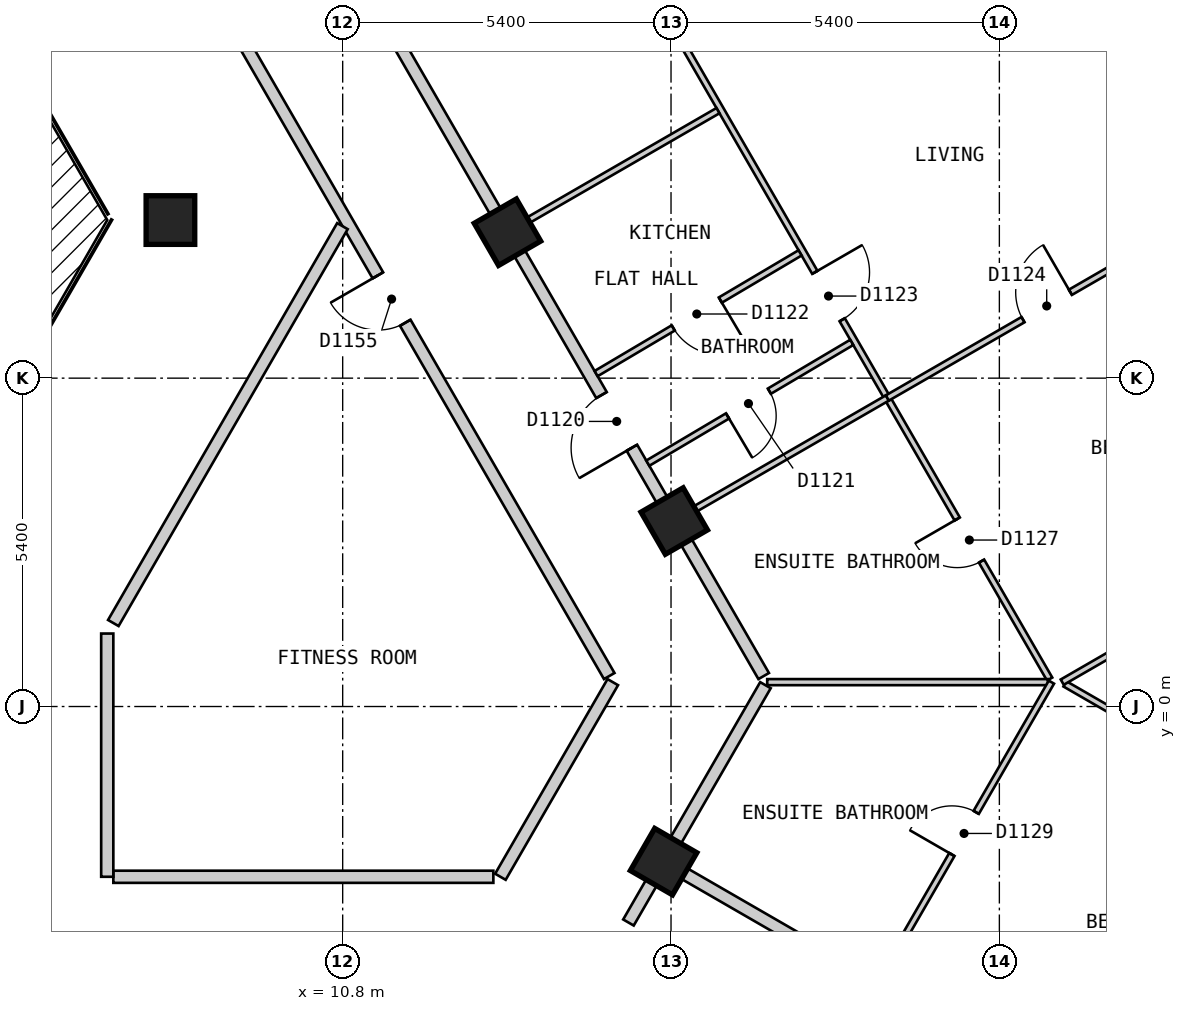
"""IFC4 building model, lengths in metres.
Left out: names, types, materials, properties, quantities, classifications, styles, units other than length and angle.
Written with IfcOpenShell. Run it as: python <this file> out.ifc"""

import sys

from ifc_helpers import new_model, si_unit, direction, frame, frame_2d, origin, origin_2d, place, context, subcontext, project, spatial, polyline, rectangle, outline, extrude, element, fill, save


model = new_model("IFC4")
c1 = context("Model", 3, precision=1e-05, world=origin(), true_north=direction((0.0, 1.0)))
c2 = subcontext(c1, "Body", "Model", "MODEL_VIEW")
j1 = project(units=[si_unit("LENGTHUNIT", "METRE"), si_unit("PLANEANGLEUNIT", "RADIAN")], contexts=[c1])
p1 = place(None, origin())
s1 = spatial("IfcSite", under=j1, at=p1, CompositionType="ELEMENT")
p2 = place(p1, origin())
s2 = spatial("IfcBuilding", under=s1, at=p2, CompositionType="ELEMENT")
p3 = place(p2, frame((0.0, 0.0, 144.6)))
s3 = spatial("IfcBuildingStorey", under=s2, at=p3, CompositionType="ELEMENT", Elevation=144.6)
for number, where, z_axis, x_axis in (
    (1, (16.078, -2.551, 0.0), (0.0, 0.0, 1.0), (0.5, 0.866, 0.0)),
    (2, (16.253, 3.05, 0.0), (0.0, 0.0, 1.0), (-0.5, 0.866, 0.0)),
    (3, (13.51, 7.8, 0.0), (0.0, 0.0, 1.0), (-0.5, 0.866, 0.0)),
    (4, (7.967, 8.0, 0.0), (0.0, 0.0, 1.0), (1.0, 0.0, 0.0)),
):
    element("IfcColumn", number, at=place(p3, frame(where, z_axis=z_axis, x_axis=x_axis)), inside=s3, PredefinedType="COLUMN", context=c2, shape_type="SweptSolid", body=[
        extrude(rectangle(XDim=0.8, YDim=0.8, at=origin_2d()), origin(), (0.0, 0.0, 1.0), 3.0),
    ])
p4 = place(p3, frame((15.862, -23.425, 0.0), z_axis=(0.0, 0.0, 1.0), x_axis=(0.500017503135, 0.866015298109, 0.0)))
e5 = element("IfcWall", 5, at=p4, inside=s3, PredefinedType="SOLIDWALL", context=c2, shape_type="SweptSolid", body=[
    extrude(outline(polyline([(0.0, -0.15), (24.711, -0.15), (24.631, 0.15), (0.08, 0.15), (0.0, -0.15)])), origin(), (0.0, 0.0, 1.0), 2.7),
])
p5 = place(p4, frame((1.4, 0.0, 0.15)))
e6 = element("IfcOpeningElement", 6, at=p5, cuts=e5, PredefinedType="OPENING", context=c2, shape_type="SweptSolid", body=[
    extrude(rectangle(XDim=1.5, YDim=2.1, at=frame_2d((0.75, 1.05))), frame((0.0, 0.16, 0.0), z_axis=(0.0, -1.0, 0.0), x_axis=(1.0, 0.0, 0.0)), (0.0, 0.0, 1.0), 0.32),
])
p6 = place(p4, frame((4.316, 0.0, 0.15)))
e7 = element("IfcOpeningElement", 7, at=p6, cuts=e5, PredefinedType="OPENING", context=c2, shape_type="SweptSolid", body=[
    extrude(rectangle(XDim=1.5, YDim=2.1, at=frame_2d((0.75, 1.05))), frame((0.0, 0.16, 0.0), z_axis=(0.0, -1.0, 0.0), x_axis=(1.0, 0.0, 0.0)), (0.0, 0.0, 1.0), 0.32),
])
p7 = place(p4, frame((7.231, 0.0, 0.15)))
e8 = element("IfcOpeningElement", 8, at=p7, cuts=e5, PredefinedType="OPENING", context=c2, shape_type="SweptSolid", body=[
    extrude(rectangle(XDim=1.5, YDim=2.1, at=frame_2d((0.75, 1.05))), frame((0.0, 0.16, 0.0), z_axis=(0.0, -1.0, 0.0), x_axis=(1.0, 0.0, 0.0)), (0.0, 0.0, 1.0), 0.32),
])
p8 = place(p4, frame((10.147, 0.0, 0.15)))
e9 = element("IfcOpeningElement", 9, at=p8, cuts=e5, PredefinedType="OPENING", context=c2, shape_type="SweptSolid", body=[
    extrude(rectangle(XDim=1.5, YDim=2.1, at=frame_2d((0.75, 1.05))), frame((0.0, 0.16, 0.0), z_axis=(0.0, -1.0, 0.0), x_axis=(1.0, 0.0, 0.0)), (0.0, 0.0, 1.0), 0.32),
])
p9 = place(p4, frame((13.062, 0.0, 0.15)))
e10 = element("IfcOpeningElement", 10, at=p9, cuts=e5, PredefinedType="OPENING", context=c2, shape_type="SweptSolid", body=[
    extrude(rectangle(XDim=1.5, YDim=2.1, at=frame_2d((0.75, 1.05))), frame((0.0, 0.16, 0.0), z_axis=(0.0, -1.0, 0.0), x_axis=(1.0, 0.0, 0.0)), (0.0, 0.0, 1.0), 0.32),
])
p10 = place(p4, frame((15.977, 0.0, 0.15)))
e11 = element("IfcOpeningElement", 11, at=p10, cuts=e5, PredefinedType="OPENING", context=c2, shape_type="SweptSolid", body=[
    extrude(rectangle(XDim=1.5, YDim=2.1, at=frame_2d((0.75, 1.05))), frame((0.0, 0.16, 0.0), z_axis=(0.0, -1.0, 0.0), x_axis=(1.0, 0.0, 0.0)), (0.0, 0.0, 1.0), 0.32),
])
p11 = place(p4, frame((18.893, 0.0, 0.15)))
e12 = element("IfcOpeningElement", 12, at=p11, cuts=e5, PredefinedType="OPENING", context=c2, shape_type="SweptSolid", body=[
    extrude(rectangle(XDim=1.5, YDim=2.1, at=frame_2d((0.75, 1.05))), frame((0.0, 0.16, 0.0), z_axis=(0.0, -1.0, 0.0), x_axis=(1.0, 0.0, 0.0)), (0.0, 0.0, 1.0), 0.32),
])
p12 = place(p4, frame((21.809, 0.0, 0.15)))
e13 = element("IfcOpeningElement", 13, at=p12, cuts=e5, PredefinedType="OPENING", context=c2, shape_type="SweptSolid", body=[
    extrude(rectangle(XDim=1.5, YDim=2.1, at=frame_2d((0.75, 1.05))), frame((0.0, 0.16, 0.0), z_axis=(0.0, -1.0, 0.0), x_axis=(1.0, 0.0, 0.0)), (0.0, 0.0, 1.0), 0.32),
])
p13 = place(p3, frame((28.218, 2.825, 0.0), z_axis=(0.0, 0.0, 1.0), x_axis=(-0.500020536353, 0.866013546791, 0.0)))
e14 = element("IfcWall", 14, at=p13, inside=s3, PredefinedType="SOLIDWALL", context=c2, shape_type="SweptSolid", body=[
    extrude(outline(polyline([(0.0, -0.15), (23.325, -0.15), (23.245, 0.15), (0.08, 0.15), (0.0, -0.15)])), origin(), (0.0, 0.0, 1.0), 2.7),
])
p14 = place(p13, frame((1.314, 0.0, 0.15)))
e15 = element("IfcOpeningElement", 15, at=p14, cuts=e14, PredefinedType="OPENING", context=c2, shape_type="SweptSolid", body=[
    extrude(rectangle(XDim=1.5, YDim=2.1, at=frame_2d((0.75, 1.05))), frame((0.0, 0.16, 0.0), z_axis=(0.0, -1.0, 0.0), x_axis=(1.0, 0.0, 0.0)), (0.0, 0.0, 1.0), 0.32),
])
p15 = place(p13, frame((4.056, 0.0, 0.15)))
e16 = element("IfcOpeningElement", 16, at=p15, cuts=e14, PredefinedType="OPENING", context=c2, shape_type="SweptSolid", body=[
    extrude(rectangle(XDim=1.5, YDim=2.1, at=frame_2d((0.75, 1.05))), frame((0.0, 0.16, 0.0), z_axis=(0.0, -1.0, 0.0), x_axis=(1.0, 0.0, 0.0)), (0.0, 0.0, 1.0), 0.32),
])
p16 = place(p13, frame((6.798, 0.0, 0.15)))
e17 = element("IfcOpeningElement", 17, at=p16, cuts=e14, PredefinedType="OPENING", context=c2, shape_type="SweptSolid", body=[
    extrude(rectangle(XDim=1.5, YDim=2.1, at=frame_2d((0.75, 1.05))), frame((0.0, 0.16, 0.0), z_axis=(0.0, -1.0, 0.0), x_axis=(1.0, 0.0, 0.0)), (0.0, 0.0, 1.0), 0.32),
])
p17 = place(p13, frame((9.541, 0.0, 0.15)))
e18 = element("IfcOpeningElement", 18, at=p17, cuts=e14, PredefinedType="OPENING", context=c2, shape_type="SweptSolid", body=[
    extrude(rectangle(XDim=1.5, YDim=2.1, at=frame_2d((0.75, 1.05))), frame((0.0, 0.16, 0.0), z_axis=(0.0, -1.0, 0.0), x_axis=(1.0, 0.0, 0.0)), (0.0, 0.0, 1.0), 0.32),
])
p18 = place(p13, frame((12.284, 0.0, 0.15)))
e19 = element("IfcOpeningElement", 19, at=p18, cuts=e14, PredefinedType="OPENING", context=c2, shape_type="SweptSolid", body=[
    extrude(rectangle(XDim=1.5, YDim=2.1, at=frame_2d((0.75, 1.05))), frame((0.0, 0.16, 0.0), z_axis=(0.0, -1.0, 0.0), x_axis=(1.0, 0.0, 0.0)), (0.0, 0.0, 1.0), 0.32),
])
p19 = place(p13, frame((15.027, 0.0, 0.15)))
e20 = element("IfcOpeningElement", 20, at=p19, cuts=e14, PredefinedType="OPENING", context=c2, shape_type="SweptSolid", body=[
    extrude(rectangle(XDim=1.5, YDim=2.1, at=frame_2d((0.75, 1.05))), frame((0.0, 0.16, 0.0), z_axis=(0.0, -1.0, 0.0), x_axis=(1.0, 0.0, 0.0)), (0.0, 0.0, 1.0), 0.32),
])
p20 = place(p13, frame((17.769, 0.0, 0.15)))
e21 = element("IfcOpeningElement", 21, at=p20, cuts=e14, PredefinedType="OPENING", context=c2, shape_type="SweptSolid", body=[
    extrude(rectangle(XDim=1.5, YDim=2.1, at=frame_2d((0.75, 1.05))), frame((0.0, 0.16, 0.0), z_axis=(0.0, -1.0, 0.0), x_axis=(1.0, 0.0, 0.0)), (0.0, 0.0, 1.0), 0.32),
])
p21 = place(p13, frame((20.511, 0.0, 0.15)))
e22 = element("IfcOpeningElement", 22, at=p21, cuts=e14, PredefinedType="OPENING", context=c2, shape_type="SweptSolid", body=[
    extrude(rectangle(XDim=1.5, YDim=2.1, at=frame_2d((0.75, 1.05))), frame((0.0, 0.16, 0.0), z_axis=(0.0, -1.0, 0.0), x_axis=(1.0, 0.0, 0.0)), (0.0, 0.0, 1.0), 0.32),
])
p22 = place(p3, frame((7.967, 13.0, 0.0), z_axis=(0.0, 0.0, 1.0), x_axis=(0.50003774998, -0.866003607726, 0.0)))
e23 = element("IfcWall", 23, at=p22, inside=s3, PredefinedType="PARTITIONING", context=c2, shape_type="SweptSolid", body=[
    extrude(rectangle(XDim=14.433, YDim=0.2, at=frame_2d((7.217, 0.0))), origin(), (0.0, 0.0, 1.0), 2.7),
])
p23 = place(p22, frame((6.824, 0.0, 0.0)))
e24 = element("IfcOpeningElement", 24, at=p23, cuts=e23, PredefinedType="OPENING", context=c2, shape_type="SweptSolid", body=[
    extrude(rectangle(XDim=0.9, YDim=2.1, at=frame_2d((0.45, 1.05))), frame((0.0, 0.11, 0.0), z_axis=(0.0, -1.0, 0.0), x_axis=(1.0, 0.0, 0.0)), (0.0, 0.0, 1.0), 0.22),
])
p24 = place(p3, frame((9.296, 15.1, 0.0), z_axis=(0.0, 0.0, 1.0), x_axis=(0.499974024244, -0.866040400375, 0.0)))
e25 = element("IfcWall", 25, at=p24, inside=s3, PredefinedType="PARTITIONING", context=c2, shape_type="SweptSolid", body=[
    extrude(rectangle(XDim=16.857, YDim=0.2, at=frame_2d((8.429, 0.0))), origin(), (0.0, 0.0, 1.0), 2.7),
])
p25 = place(p24, frame((11.522, 0.0, 0.0)))
e26 = element("IfcOpeningElement", 26, at=p25, cuts=e25, PredefinedType="OPENING", context=c2, shape_type="SweptSolid", body=[
    extrude(rectangle(XDim=1.0, YDim=2.1, at=frame_2d((0.5, 1.05))), frame((0.0, 0.11, 0.0), z_axis=(0.0, -1.0, 0.0), x_axis=(1.0, 0.0, 0.0)), (0.0, 0.0, 1.0), 0.22),
])
p26 = place(p3, frame((7.028, -2.8, 0.0), z_axis=(0.0, 0.0, 1.0), x_axis=(1.0, 0.0, 0.0)))
e27 = element("IfcWall", 27, at=p26, inside=s3, PredefinedType="PARTITIONING", context=c2, shape_type="SweptSolid", body=[
    extrude(rectangle(XDim=6.25, YDim=0.2, at=frame_2d((3.125, 0.0))), origin(), (0.0, 0.0, 1.0), 2.7),
])
p27 = place(p3, frame((7.028, 1.373, 0.0), z_axis=(0.0, 0.0, 1.0), x_axis=(0.499954271211, 0.866051803703, 0.0)))
e28 = element("IfcWall", 28, at=p27, inside=s3, PredefinedType="PARTITIONING", context=c2, shape_type="SweptSolid", body=[
    extrude(rectangle(XDim=7.536, YDim=0.2, at=frame_2d((3.768, 0.0))), origin(), (0.0, 0.0, 1.0), 2.7),
])
p28 = place(p3, frame((13.394, -2.8, 0.0), z_axis=(0.0, 0.0, 1.0), x_axis=(0.499968324138, 0.866043691079, 0.0)))
e29 = element("IfcWall", 29, at=p28, inside=s3, PredefinedType="PARTITIONING", context=c2, shape_type="SweptSolid", body=[
    extrude(rectangle(XDim=3.696, YDim=0.2, at=frame_2d((1.848, 0.0))), origin(), (0.0, 0.0, 1.0), 2.7),
])
p29 = place(p3, frame((15.5, -3.552, 0.0), z_axis=(0.0, 0.0, 1.0), x_axis=(0.499914724673, 0.86607463192, 0.0)))
e30 = element("IfcWall", 30, at=p29, inside=s3, PredefinedType="PARTITIONING", context=c2, shape_type="SweptSolid", body=[
    extrude(rectangle(XDim=4.507, YDim=0.2, at=frame_2d((2.253, 0.0))), origin(), (0.0, 0.0, 1.0), 2.7),
])
p30 = place(p3, frame((6.928, -2.8, 0.0), z_axis=(0.0, 0.0, 1.0), x_axis=(0.0, 1.0, 0.0)))
e31 = element("IfcWall", 31, at=p30, inside=s3, PredefinedType="PARTITIONING", context=c2, shape_type="SweptSolid", body=[
    extrude(rectangle(XDim=4.0, YDim=0.2, at=frame_2d((2.0, 0.0))), origin(), (0.0, 0.0, 1.0), 2.7),
])
p31 = place(p3, frame((14.323, 14.487, 0.0), z_axis=(0.0, 0.0, 1.0), x_axis=(0.500011052545, -0.866019022501, 0.0)))
e32 = element("IfcWall", 32, at=p31, inside=s3, PredefinedType="PARTITIONING", context=c2, shape_type="SweptSolid", body=[
    extrude(rectangle(XDim=16.208, YDim=0.1, at=frame_2d((8.104, 0.0))), origin(), (0.0, 0.0, 1.0), 2.7),
])
p32 = place(p31, frame((8.484, 0.0, 0.0)))
e33 = element("IfcOpeningElement", 33, at=p32, cuts=e32, PredefinedType="OPENING", context=c2, shape_type="SweptSolid", body=[
    extrude(rectangle(XDim=0.9, YDim=2.1, at=frame_2d((0.45, 1.05))), frame((0.0, 0.06, 0.0), z_axis=(0.0, -1.0, 0.0), x_axis=(1.0, 0.0, 0.0)), (0.0, 0.0, 1.0), 0.12),
])
p33 = place(p31, frame((2.252, 0.0, 0.0)))
e34 = element("IfcOpeningElement", 34, at=p33, cuts=e32, PredefinedType="OPENING", context=c2, shape_type="SweptSolid", body=[
    extrude(rectangle(XDim=0.8, YDim=2.1, at=frame_2d((0.4, 1.05))), frame((0.0, 0.06, 0.0), z_axis=(0.0, -1.0, 0.0), x_axis=(1.0, 0.0, 0.0)), (0.0, 0.0, 1.0), 0.12),
])
p34 = place(p31, frame((13.167, 0.0, 0.0)))
e35 = element("IfcOpeningElement", 35, at=p34, cuts=e32, PredefinedType="OPENING", context=c2, shape_type="SweptSolid", body=[
    extrude(rectangle(XDim=0.8, YDim=2.1, at=frame_2d((0.4, 1.05))), frame((0.0, 0.06, 0.0), z_axis=(0.0, -1.0, 0.0), x_axis=(1.0, 0.0, 0.0)), (0.0, 0.0, 1.0), 0.12),
])
p35 = place(p3, frame((22.679, 0.372, 0.0), z_axis=(0.0, 0.0, 1.0), x_axis=(0.865985260119, -0.500069524424, 0.0)))
e36 = element("IfcWall", 36, at=p35, inside=s3, PredefinedType="PARTITIONING", context=c2, shape_type="SweptSolid", body=[
    extrude(rectangle(XDim=5.845, YDim=0.1, at=frame_2d((2.923, 0.0))), origin(), (0.0, 0.0, 1.0), 2.7),
])
p36 = place(p35, frame((2.444, 0.0, 0.0)))
e37 = element("IfcOpeningElement", 37, at=p36, cuts=e36, PredefinedType="OPENING", context=c2, shape_type="SweptSolid", body=[
    extrude(rectangle(XDim=0.9, YDim=2.1, at=frame_2d((0.45, 1.05))), frame((0.0, 0.06, 0.0), z_axis=(0.0, -1.0, 0.0), x_axis=(1.0, 0.0, 0.0)), (0.0, 0.0, 1.0), 0.12),
])
p37 = place(p3, frame((17.782, 0.401, 0.0), z_axis=(0.0, 0.0, 1.0), x_axis=(1.0, 0.0, 0.0)))
e38 = element("IfcWall", 38, at=p37, inside=s3, PredefinedType="PARTITIONING", context=c2, shape_type="SweptSolid", body=[
    extrude(rectangle(XDim=4.616, YDim=0.1, at=frame_2d((2.308, 0.0))), origin(), (0.0, 0.0, 1.0), 2.7),
])
p38 = place(p3, frame((19.633, -4.488, 0.0), z_axis=(0.0, 0.0, 1.0), x_axis=(0.500050624552, 0.865996173713, 0.0)))
e39 = element("IfcWall", 39, at=p38, inside=s3, PredefinedType="PARTITIONING", context=c2, shape_type="SweptSolid", body=[
    extrude(rectangle(XDim=5.646, YDim=0.1, at=frame_2d((2.823, 0.0))), origin(), (0.0, 0.0, 1.0), 2.7),
])
p39 = place(p38, frame((2.372, 0.0, 0.0)))
e40 = element("IfcOpeningElement", 40, at=p39, cuts=e39, PredefinedType="OPENING", context=c2, shape_type="SweptSolid", body=[
    extrude(rectangle(XDim=0.8, YDim=2.1, at=frame_2d((0.4, 1.05))), frame((0.0, 0.06, 0.0), z_axis=(0.0, -1.0, 0.0), x_axis=(1.0, 0.0, 0.0)), (0.0, 0.0, 1.0), 0.12),
])
p40 = place(p3, frame((16.339, 3.1, 0.0), z_axis=(0.0, 0.0, 1.0), x_axis=(0.866031112038, 0.499990112884, 0.0)))
e41 = element("IfcWall", 41, at=p40, inside=s3, PredefinedType="PARTITIONING", context=c2, shape_type="SweptSolid", body=[
    extrude(rectangle(XDim=3.948, YDim=0.1, at=frame_2d((1.974, 0.0))), origin(), (0.0, 0.0, 1.0), 2.7),
])
p41 = place(p3, frame((22.634, 0.401, 0.0), z_axis=(0.0, 0.0, 1.0), x_axis=(0.86601325737, 0.500021037617, 0.0)))
e42 = element("IfcWall", 42, at=p41, inside=s3, PredefinedType="PARTITIONING", context=c2, shape_type="SweptSolid", body=[
    extrude(rectangle(XDim=5.898, YDim=0.1, at=frame_2d((2.949, 0.0))), origin(), (0.0, 0.0, 1.0), 2.7),
])
p42 = place(p41, frame((2.499, 0.0, 0.0)))
e43 = element("IfcOpeningElement", 43, at=p42, cuts=e42, PredefinedType="OPENING", context=c2, shape_type="SweptSolid", body=[
    extrude(rectangle(XDim=0.9, YDim=2.1, at=frame_2d((0.45, 1.05))), frame((0.0, 0.06, 0.0), z_axis=(0.0, -1.0, 0.0), x_axis=(1.0, 0.0, 0.0)), (0.0, 0.0, 1.0), 0.12),
])
p43 = place(p3, frame((13.597, 7.85, 0.0), z_axis=(0.0, 0.0, 1.0), x_axis=(0.865979019114, 0.500080332001, 0.0)))
e44 = element("IfcWall", 44, at=p43, inside=s3, PredefinedType="PARTITIONING", context=c2, shape_type="SweptSolid", body=[
    extrude(rectangle(XDim=3.897, YDim=0.1, at=frame_2d((1.949, 0.0))), origin(), (0.0, 0.0, 1.0), 2.7),
])
p44 = place(p3, frame((15.818, 4.002, 0.0), z_axis=(0.0, 0.0, 1.0), x_axis=(0.860457323494, 0.509522516132, 0.0)))
e45 = element("IfcWall", 45, at=p44, inside=s3, PredefinedType="PARTITIONING", context=c2, shape_type="SweptSolid", body=[
    extrude(rectangle(XDim=3.898, YDim=0.1, at=frame_2d((1.949, 0.0))), origin(), (0.0, 0.0, 1.0), 2.7),
])
p45 = place(p44, frame((1.524, 0.0, 0.0)))
e46 = element("IfcOpeningElement", 46, at=p45, cuts=e45, PredefinedType="OPENING", context=c2, shape_type="SweptSolid", body=[
    extrude(rectangle(XDim=0.8, YDim=2.1, at=frame_2d((0.4, 1.05))), frame((0.0, 0.06, 0.0), z_axis=(0.0, -1.0, 0.0), x_axis=(1.0, 0.0, 0.0)), (0.0, 0.0, 1.0), 0.12),
])
p46 = place(p3, frame((14.968, 5.475, 0.0), z_axis=(0.0, 0.0, 1.0), x_axis=(0.860594613521, 0.509290596005, 0.0)))
e47 = element("IfcWall", 47, at=p46, inside=s3, PredefinedType="PARTITIONING", context=c2, shape_type="SweptSolid", body=[
    extrude(rectangle(XDim=3.897, YDim=0.1, at=frame_2d((1.949, 0.0))), origin(), (0.0, 0.0, 1.0), 2.7),
])
p47 = place(p46, frame((1.474, 0.0, 0.0)))
e48 = element("IfcOpeningElement", 48, at=p47, cuts=e47, PredefinedType="OPENING", context=c2, shape_type="SweptSolid", body=[
    extrude(rectangle(XDim=0.9, YDim=2.1, at=frame_2d((0.45, 1.05))), frame((0.0, 0.06, 0.0), z_axis=(0.0, -1.0, 0.0), x_axis=(1.0, 0.0, 0.0)), (0.0, 0.0, 1.0), 0.12),
])
p48 = place(p3, frame((16.165, -2.601, 0.0), z_axis=(0.0, 0.0, 1.0), x_axis=(0.866016855193, -0.500014806302, 0.0)))
e49 = element("IfcWall", 49, at=p48, inside=s3, PredefinedType="PARTITIONING", context=c2, shape_type="SweptSolid", body=[
    extrude(rectangle(XDim=10.0, YDim=0.2, at=frame_2d((5.0, 0.0))), origin(), (0.0, 0.0, 1.0), 2.7),
])
p49 = place(p3, frame((19.758, 5.074, 0.0), z_axis=(0.0, 0.0, 1.0), x_axis=(0.866007554612, 0.500030914399, 0.0)))
e50 = element("IfcWall", 50, at=p49, inside=s3, PredefinedType="PARTITIONING", context=c2, shape_type="SweptSolid", body=[
    extrude(rectangle(XDim=6.052, YDim=0.1, at=frame_2d((3.026, 0.0))), origin(), (0.0, 0.0, 1.0), 2.7),
])
p50 = place(p49, frame((2.576, 0.0, 0.0)))
e51 = element("IfcOpeningElement", 51, at=p50, cuts=e50, PredefinedType="OPENING", context=c2, shape_type="SweptSolid", body=[
    extrude(rectangle(XDim=0.9, YDim=2.1, at=frame_2d((0.45, 1.05))), frame((0.0, 0.06, 0.0), z_axis=(0.0, -1.0, 0.0), x_axis=(1.0, 0.0, 0.0)), (0.0, 0.0, 1.0), 0.12),
])
p51 = place(p25, origin())
e52 = element("IfcDoor", 52, at=p51, inside=s3, OperationType="SINGLE_SWING_RIGHT", PredefinedType="DOOR", context=c2, shape_type="SweptSolid", body=[
    extrude(rectangle(XDim=1.0, YDim=2.1, at=frame_2d((0.5, 1.05))), frame((0.0, 0.025, 0.0), z_axis=(0.0, -1.0, 0.0), x_axis=(1.0, 0.0, 0.0)), (0.0, 0.0, 1.0), 0.05),
])
fill(e26, e52)
p52 = place(p45, origin())
e53 = element("IfcDoor", 53, at=p52, inside=s3, OperationType="SINGLE_SWING_LEFT", PredefinedType="DOOR", context=c2, shape_type="SweptSolid", body=[
    extrude(rectangle(XDim=0.8, YDim=2.1, at=frame_2d((0.4, 1.05))), frame((0.0, 0.025, 0.0), z_axis=(0.0, -1.0, 0.0), x_axis=(1.0, 0.0, 0.0)), (0.0, 0.0, 1.0), 0.05),
])
fill(e46, e53)
p53 = place(p47, origin())
e54 = element("IfcDoor", 54, at=p53, inside=s3, OperationType="SINGLE_SWING_RIGHT", PredefinedType="DOOR", context=c2, shape_type="SweptSolid", body=[
    extrude(rectangle(XDim=0.9, YDim=2.1, at=frame_2d((0.45, 1.05))), frame((0.0, 0.025, 0.0), z_axis=(0.0, -1.0, 0.0), x_axis=(1.0, 0.0, 0.0)), (0.0, 0.0, 1.0), 0.05),
])
fill(e48, e54)
p54 = place(p32, origin())
e55 = element("IfcDoor", 55, at=p54, inside=s3, OperationType="SINGLE_SWING_LEFT", PredefinedType="DOOR", context=c2, shape_type="SweptSolid", body=[
    extrude(rectangle(XDim=0.9, YDim=2.1, at=frame_2d((0.45, 1.05))), frame((0.0, 0.025, 0.0), z_axis=(0.0, -1.0, 0.0), x_axis=(1.0, 0.0, 0.0)), (0.0, 0.0, 1.0), 0.05),
])
fill(e33, e55)
p55 = place(p50, origin())
e56 = element("IfcDoor", 56, at=p55, inside=s3, OperationType="SINGLE_SWING_RIGHT", PredefinedType="DOOR", context=c2, shape_type="SweptSolid", body=[
    extrude(rectangle(XDim=0.9, YDim=2.1, at=frame_2d((0.45, 1.05))), frame((0.0, 0.025, 0.0), z_axis=(0.0, -1.0, 0.0), x_axis=(1.0, 0.0, 0.0)), (0.0, 0.0, 1.0), 0.05),
])
fill(e51, e56)
p56 = place(p34, origin())
e57 = element("IfcDoor", 57, at=p56, inside=s3, OperationType="SINGLE_SWING_LEFT", PredefinedType="DOOR", context=c2, shape_type="SweptSolid", body=[
    extrude(rectangle(XDim=0.8, YDim=2.1, at=frame_2d((0.4, 1.05))), frame((0.0, 0.025, 0.0), z_axis=(0.0, -1.0, 0.0), x_axis=(1.0, 0.0, 0.0)), (0.0, 0.0, 1.0), 0.05),
])
fill(e35, e57)
p57 = place(p39, origin())
e58 = element("IfcDoor", 58, at=p57, inside=s3, OperationType="SINGLE_SWING_LEFT", PredefinedType="DOOR", context=c2, shape_type="SweptSolid", body=[
    extrude(rectangle(XDim=0.8, YDim=2.1, at=frame_2d((0.4, 1.05))), frame((0.0, 0.025, 0.0), z_axis=(0.0, -1.0, 0.0), x_axis=(1.0, 0.0, 0.0)), (0.0, 0.0, 1.0), 0.05),
])
fill(e40, e58)
p58 = place(p23, origin())
e59 = element("IfcDoor", 59, at=p58, inside=s3, OperationType="SINGLE_SWING_LEFT", PredefinedType="DOOR", context=c2, shape_type="SweptSolid", body=[
    extrude(rectangle(XDim=0.9, YDim=2.1, at=frame_2d((0.45, 1.05))), frame((0.0, 0.025, 0.0), z_axis=(0.0, -1.0, 0.0), x_axis=(1.0, 0.0, 0.0)), (0.0, 0.0, 1.0), 0.05),
])
fill(e24, e59)
save(model, sys.argv[1])
